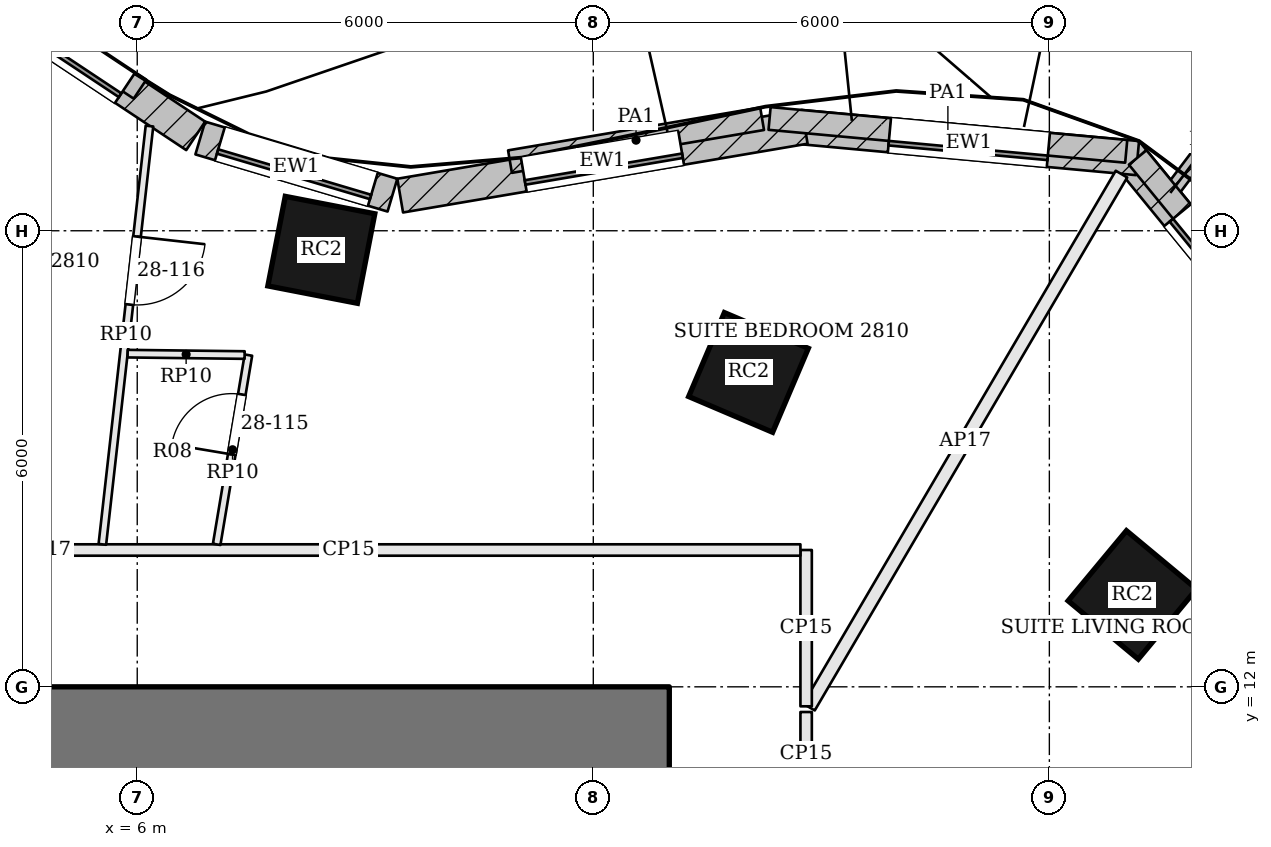
"""IFC4 building model, lengths in metres.
Left out: names, types, materials, properties, quantities, classifications, styles, units other than length and angle.
Written with IfcOpenShell. Run it as: python <this file> out.ifc"""

import sys

from ifc_helpers import new_model, si_unit, direction, frame, frame_2d, origin, origin_2d, place, context, subcontext, project, spatial, rectangle, extrude, element, fill, save


model = new_model("IFC4")
c1 = context("Model", 3, precision=1e-05, world=origin(), true_north=direction((0.0, 1.0)))
c2 = subcontext(c1, "Body", "Model", "MODEL_VIEW")
j1 = project(units=[si_unit("LENGTHUNIT", "METRE"), si_unit("PLANEANGLEUNIT", "RADIAN")], contexts=[c1])
p1 = place(None, origin())
s1 = spatial("IfcSite", under=j1, at=p1, CompositionType="ELEMENT")
p2 = place(p1, origin())
s2 = spatial("IfcBuilding", under=s1, at=p2, CompositionType="ELEMENT")
p3 = place(p2, frame((0.0, 0.0, 117.6)))
s3 = spatial("IfcBuildingStorey", under=s2, at=p3, CompositionType="ELEMENT", Elevation=117.6)
p4 = place(p3, frame((-13.0, 11.45, 0.0), z_axis=(0.0, 0.0, 1.0), x_axis=(1.0, 0.0, 0.0)))
e1 = element("IfcWall", 1, at=p4, inside=s3, PredefinedType="SHEAR", context=c2, shape_type="SweptSolid", body=[
    extrude(rectangle(XDim=26.0, YDim=1.1, at=frame_2d((13.0, 0.0))), origin(), (0.0, 0.0, 1.0), 3.6),
])
p5 = place(p4, frame((8.825, 0.0, 0.0)))
e2 = element("IfcOpeningElement", 2, at=p5, cuts=e1, PredefinedType="OPENING", context=c2, shape_type="SweptSolid", body=[
    extrude(rectangle(XDim=1.0, YDim=2.1, at=frame_2d((0.5, 1.05))), frame((0.0, 0.56, 0.0), z_axis=(0.0, -1.0, 0.0), x_axis=(1.0, 0.0, 0.0)), (0.0, 0.0, 1.0), 1.12),
])
p6 = place(p4, frame((11.275, 0.0, 0.0)))
e3 = element("IfcOpeningElement", 3, at=p6, cuts=e1, PredefinedType="OPENING", context=c2, shape_type="SweptSolid", body=[
    extrude(rectangle(XDim=1.0, YDim=2.1, at=frame_2d((0.5, 1.05))), frame((0.0, 0.56, 0.0), z_axis=(0.0, -1.0, 0.0), x_axis=(1.0, 0.0, 0.0)), (0.0, 0.0, 1.0), 1.12),
])
p7 = place(p4, frame((14.125, 0.0, 0.0)))
e4 = element("IfcOpeningElement", 4, at=p7, cuts=e1, PredefinedType="OPENING", context=c2, shape_type="SweptSolid", body=[
    extrude(rectangle(XDim=1.0, YDim=2.1, at=frame_2d((0.5, 1.05))), frame((0.0, 0.56, 0.0), z_axis=(0.0, -1.0, 0.0), x_axis=(1.0, 0.0, 0.0)), (0.0, 0.0, 1.0), 1.12),
])
p8 = place(p4, frame((16.725, 0.0, 0.0)))
e5 = element("IfcOpeningElement", 5, at=p8, cuts=e1, PredefinedType="OPENING", context=c2, shape_type="SweptSolid", body=[
    extrude(rectangle(XDim=0.7, YDim=2.1, at=frame_2d((0.35, 1.05))), frame((0.0, 0.56, 0.0), z_axis=(0.0, -1.0, 0.0), x_axis=(1.0, 0.0, 0.0)), (0.0, 0.0, 1.0), 1.12),
])
for number, where, z_axis, x_axis in (
    (6, (19.092, 13.209, 0.0), (0.0, 0.0, 1.0), (-0.769, 0.639, 0.0)),
    (7, (14.042, 16.136, 0.0), (0.0, 0.0, 1.0), (-0.92, 0.392, 0.0)),
    (8, (8.422, 17.749, 0.0), (0.0, 0.0, 1.0), (-0.982, 0.191, 0.0)),
):
    element("IfcColumn", number, at=place(p3, frame(where, z_axis=z_axis, x_axis=x_axis)), inside=s3, PredefinedType="COLUMN", context=c2, shape_type="SweptSolid", body=[
        extrude(rectangle(XDim=1.2, YDim=1.2, at=origin_2d()), origin(), (0.0, 0.0, 1.0), 2.8),
    ])
p9 = place(p3, frame((21.696, 15.748, 0.0), z_axis=(0.0, 0.0, 1.0), x_axis=(-0.632968710519, 0.774177377288, 0.0)))
e9 = element("IfcWall", 9, at=p9, inside=s3, PredefinedType="SOLIDWALL", context=c2, shape_type="SweptSolid", body=[
    extrude(rectangle(XDim=4.25, YDim=0.45, at=frame_2d((2.125, 0.0))), origin(), (0.0, 0.0, 1.0), 3.3),
])
p10 = place(p9, frame((1.075, 0.0, 0.9)))
e10 = element("IfcOpeningElement", 10, at=p10, cuts=e9, PredefinedType="OPENING", context=c2, shape_type="SweptSolid", body=[
    extrude(rectangle(XDim=2.1, YDim=1.8, at=frame_2d((1.05, 0.9))), frame((0.0, 0.235, 0.0), z_axis=(0.0, -1.0, 0.0), x_axis=(1.0, 0.0, 0.0)), (0.0, 0.0, 1.0), 0.47),
])
p11 = place(p3, frame((19.159, 18.956, 0.0), z_axis=(0.0, 0.0, 1.0), x_axis=(-0.995777399421, 0.091800712424, 0.0)))
e11 = element("IfcWall", 11, at=p11, inside=s3, PredefinedType="SOLIDWALL", context=c2, shape_type="SweptSolid", body=[
    extrude(rectangle(XDim=4.455, YDim=0.45, at=frame_2d((2.227, 0.0))), origin(), (0.0, 0.0, 1.0), 3.3),
])
p12 = place(p11, frame((1.177, 0.0, 0.9)))
e12 = element("IfcOpeningElement", 12, at=p12, cuts=e11, PredefinedType="OPENING", context=c2, shape_type="SweptSolid", body=[
    extrude(rectangle(XDim=2.1, YDim=1.8, at=frame_2d((1.05, 0.9))), frame((0.0, 0.235, 0.0), z_axis=(0.0, -1.0, 0.0), x_axis=(1.0, 0.0, 0.0)), (0.0, 0.0, 1.0), 0.47),
])
p13 = place(p3, frame((14.782, 19.367, 0.0), z_axis=(0.0, 0.0, 1.0), x_axis=(-0.98585584667, -0.167595493934, 0.0)))
e13 = element("IfcWall", 13, at=p13, inside=s3, PredefinedType="SOLIDWALL", context=c2, shape_type="SweptSolid", body=[
    extrude(rectangle(XDim=5.399, YDim=0.45, at=frame_2d((2.699, 0.0))), origin(), (0.0, 0.0, 1.0), 3.3),
])
p14 = place(p13, frame((1.649, 0.0, 0.9)))
e14 = element("IfcOpeningElement", 14, at=p14, cuts=e13, PredefinedType="OPENING", context=c2, shape_type="SweptSolid", body=[
    extrude(rectangle(XDim=2.1, YDim=1.8, at=frame_2d((1.05, 0.9))), frame((0.0, 0.235, 0.0), z_axis=(0.0, -1.0, 0.0), x_axis=(1.0, 0.0, 0.0)), (0.0, 0.0, 1.0), 0.47),
])
p15 = place(p3, frame((9.357, 18.469, 0.0), z_axis=(0.0, 0.0, 1.0), x_axis=(-0.958524054629, 0.285011643091, 0.0)))
e15 = element("IfcWall", 15, at=p15, inside=s3, PredefinedType="SOLIDWALL", context=c2, shape_type="SweptSolid", body=[
    extrude(rectangle(XDim=2.637, YDim=0.45, at=frame_2d((1.319, 0.0))), origin(), (0.0, 0.0, 1.0), 3.3),
])
p16 = place(p15, frame((0.269, 0.0, 0.9)))
e16 = element("IfcOpeningElement", 16, at=p16, cuts=e15, PredefinedType="OPENING", context=c2, shape_type="SweptSolid", body=[
    extrude(rectangle(XDim=2.1, YDim=1.8, at=frame_2d((1.05, 0.9))), frame((0.0, 0.235, 0.0), z_axis=(0.0, -1.0, 0.0), x_axis=(1.0, 0.0, 0.0)), (0.0, 0.0, 1.0), 0.47),
])
p17 = place(p3, frame((6.769, 19.248, 0.0), z_axis=(0.0, 0.0, 1.0), x_axis=(-0.832973379274, 0.553313066375, 0.0)))
e17 = element("IfcWall", 17, at=p17, inside=s3, PredefinedType="SOLIDWALL", context=c2, shape_type="SweptSolid", body=[
    extrude(rectangle(XDim=4.348, YDim=0.45, at=frame_2d((2.174, 0.0))), origin(), (0.0, 0.0, 1.0), 3.3),
])
p18 = place(p17, frame((1.124, 0.0, 0.9)))
e18 = element("IfcOpeningElement", 18, at=p18, cuts=e17, PredefinedType="OPENING", context=c2, shape_type="SweptSolid", body=[
    extrude(rectangle(XDim=2.1, YDim=1.8, at=frame_2d((1.05, 0.9))), frame((0.0, 0.235, 0.0), z_axis=(0.0, -1.0, 0.0), x_axis=(1.0, 0.0, 0.0)), (0.0, 0.0, 1.0), 0.47),
])
p19 = place(p3, frame((19.591, 18.498, 0.0), z_axis=(0.0, 0.0, 1.0), x_axis=(0.603387525063, 0.797448114048, 0.0)))
e19 = element("IfcWall", 19, at=p19, inside=s3, PredefinedType="SOLIDWALL", context=c2, shape_type="SweptSolid", body=[
    extrude(rectangle(XDim=1.75, YDim=0.2, at=frame_2d((0.875, 0.0))), origin(), (0.0, 0.0, 1.0), 3.3),
])
p20 = place(p3, frame((21.691, 15.872, 3.6), z_axis=(0.0, 0.0, 1.0), x_axis=(-0.632984818356, 0.774164207214, 0.0)))
e20 = element("IfcWall", 20, at=p20, inside=s3, PredefinedType="PARAPET", context=c2, shape_type="SweptSolid", body=[
    extrude(rectangle(XDim=3.995, YDim=0.3, at=frame_2d((1.997, 0.0))), origin(), (0.0, 0.0, 1.0), 1.1),
])
p21 = place(p3, frame((19.011, 19.045, 3.6), z_axis=(0.0, 0.0, 1.0), x_axis=(-0.995781185236, 0.091759637809, 0.0)))
e21 = element("IfcWall", 21, at=p21, inside=s3, PredefinedType="PARAPET", context=c2, shape_type="SweptSolid", body=[
    extrude(rectangle(XDim=4.712, YDim=0.3, at=frame_2d((2.356, 0.0))), origin(), (0.0, 0.0, 1.0), 1.1),
])
p22 = place(p3, frame((14.221, 19.473, 3.6), z_axis=(0.0, 0.0, 1.0), x_axis=(-0.985863279186, -0.167551767381, 0.0)))
e22 = element("IfcWall", 22, at=p22, inside=s3, PredefinedType="PARAPET", context=c2, shape_type="SweptSolid", body=[
    extrude(rectangle(XDim=3.365, YDim=0.3, at=frame_2d((1.682, 0.0))), origin(), (0.0, 0.0, 1.0), 1.1),
])
p23 = place(p3, frame((6.037, 19.863, 3.6), z_axis=(0.0, 0.0, 1.0), x_axis=(-0.832989992548, 0.553288055459, 0.0)))
e23 = element("IfcWall", 23, at=p23, inside=s3, PredefinedType="PARAPET", context=c2, shape_type="SweptSolid", body=[
    extrude(rectangle(XDim=3.154, YDim=0.3, at=frame_2d((1.577, 0.0))), origin(), (0.0, 0.0, 1.0), 1.1),
])
p24 = place(p3, frame((14.8, 10.572, 0.0), z_axis=(0.0, 0.0, 1.0), x_axis=(0.0, 1.0, 0.0)))
e24 = element("IfcWall", 24, at=p24, inside=s3, PredefinedType="PARTITIONING", context=c2, shape_type="SweptSolid", body=[
    extrude(rectangle(XDim=1.097, YDim=0.15, at=frame_2d((0.548, 0.0))), origin(), (0.0, 0.0, 1.0), 2.684),
])
p25 = place(p3, frame((18.949, 18.745, 0.0), z_axis=(0.0, 0.0, 1.0), x_axis=(-0.505754187447, -0.862677634972, 0.0)))
e25 = element("IfcWall", 25, at=p25, inside=s3, PredefinedType="PARTITIONING", context=c2, shape_type="SweptSolid", body=[
    extrude(rectangle(XDim=8.128, YDim=0.175, at=frame_2d((4.064, 0.0))), origin(), (0.0, 0.0, 1.0), 2.684),
])
p26 = place(p3, frame((14.8, 11.744, 0.0), z_axis=(0.0, 0.0, 1.0), x_axis=(0.0, 1.0, 0.0)))
e26 = element("IfcWall", 26, at=p26, inside=s3, PredefinedType="PARTITIONING", context=c2, shape_type="SweptSolid", body=[
    extrude(rectangle(XDim=2.056, YDim=0.15, at=frame_2d((1.028, 0.0))), origin(), (0.0, 0.0, 1.0), 2.684),
])
p27 = place(p3, frame((14.725, 13.8, 0.0), z_axis=(0.0, 0.0, 1.0), x_axis=(-1.0, 0.0, 0.0)))
e27 = element("IfcWall", 27, at=p27, inside=s3, PredefinedType="PARTITIONING", context=c2, shape_type="SweptSolid", body=[
    extrude(rectangle(XDim=11.889, YDim=0.15, at=frame_2d((5.945, 0.0))), origin(), (0.0, 0.0, 1.0), 2.684),
])
p28 = place(p27, frame((10.041, 0.0, 0.0)))
e28 = element("IfcOpeningElement", 28, at=p28, cuts=e27, PredefinedType="OPENING", context=c2, shape_type="SweptSolid", body=[
    extrude(rectangle(XDim=1.0, YDim=2.1, at=frame_2d((0.5, 1.05))), frame((0.0, 0.085, 0.0), z_axis=(0.0, -1.0, 0.0), x_axis=(1.0, 0.0, 0.0)), (0.0, 0.0, 1.0), 0.17),
])
p29 = place(p3, frame((22.414, 11.576, 0.0), z_axis=(0.0, 0.0, 1.0), x_axis=(-0.77113161257, -0.636675769992, 0.0)))
e29 = element("IfcWall", 29, at=p29, inside=s3, PredefinedType="PARTITIONING", context=c2, shape_type="SweptSolid", body=[
    extrude(rectangle(XDim=5.89, YDim=0.1, at=frame_2d((2.945, 0.0))), origin(), (0.0, 0.0, 1.0), 2.684),
])
p30 = place(p29, frame((1.815, 0.0, 0.0)))
e30 = element("IfcOpeningElement", 30, at=p30, cuts=e29, PredefinedType="OPENING", context=c2, shape_type="SweptSolid", body=[
    extrude(rectangle(XDim=0.9, YDim=2.4, at=frame_2d((0.45, 1.2))), frame((0.0, 0.06, 0.0), z_axis=(0.0, -1.0, 0.0), x_axis=(1.0, 0.0, 0.0)), (0.0, 0.0, 1.0), 0.12),
])
p31 = place(p3, frame((6.161, 19.377, 0.0), z_axis=(0.0, 0.0, 1.0), x_axis=(-0.11193626313, -0.993715388326, 0.0)))
e31 = element("IfcWall", 31, at=p31, inside=s3, PredefinedType="PARTITIONING", context=c2, shape_type="SweptSolid", body=[
    extrude(rectangle(XDim=5.538, YDim=0.1, at=frame_2d((2.769, 0.0))), origin(), (0.0, 0.0, 1.0), 2.684),
])
p32 = place(p31, frame((1.463, 0.0, 0.0)))
e32 = element("IfcOpeningElement", 32, at=p32, cuts=e31, PredefinedType="OPENING", context=c2, shape_type="SweptSolid", body=[
    extrude(rectangle(XDim=0.9, YDim=2.4, at=frame_2d((0.45, 1.2))), frame((0.0, 0.06, 0.0), z_axis=(0.0, -1.0, 0.0), x_axis=(1.0, 0.0, 0.0)), (0.0, 0.0, 1.0), 0.12),
])
p33 = place(p3, frame((7.045, 13.874, 0.0), z_axis=(0.0, 0.0, 1.0), x_axis=(0.165339678844, 0.986236680823, 0.0)))
e33 = element("IfcWall", 33, at=p33, inside=s3, PredefinedType="PARTITIONING", context=c2, shape_type="SweptSolid", body=[
    extrude(rectangle(XDim=2.525, YDim=0.1, at=frame_2d((1.262, 0.0))), origin(), (0.0, 0.0, 1.0), 2.684),
])
p34 = place(p33, frame((1.2, 0.0, 0.0)))
e34 = element("IfcOpeningElement", 34, at=p34, cuts=e33, PredefinedType="OPENING", context=c2, shape_type="SweptSolid", body=[
    extrude(rectangle(XDim=0.8, YDim=2.1, at=frame_2d((0.4, 1.05))), frame((0.0, 0.06, 0.0), z_axis=(0.0, -1.0, 0.0), x_axis=(1.0, 0.0, 0.0)), (0.0, 0.0, 1.0), 0.12),
])
p35 = place(p3, frame((7.413, 16.365, 0.0), z_axis=(0.0, 0.0, 1.0), x_axis=(-0.999929213278, 0.011898253371, 0.0)))
e35 = element("IfcWall", 35, at=p35, inside=s3, PredefinedType="PARTITIONING", context=c2, shape_type="SweptSolid", body=[
    extrude(rectangle(XDim=1.539, YDim=0.1, at=frame_2d((0.77, 0.0))), origin(), (0.0, 0.0, 1.0), 2.684),
])
p36 = place(p10, origin())
e36 = element("IfcWindow", 36, at=p36, inside=s3, PartitioningType="SINGLE_PANEL", PredefinedType="WINDOW", context=c2, shape_type="SweptSolid", body=[
    extrude(rectangle(XDim=2.1, YDim=1.8, at=frame_2d((1.05, 0.9))), frame((0.0, 0.135, 0.0), z_axis=(0.0, -1.0, 0.0), x_axis=(1.0, 0.0, 0.0)), (0.0, 0.0, 1.0), 0.06),
])
fill(e10, e36)
p37 = place(p12, origin())
e37 = element("IfcWindow", 37, at=p37, inside=s3, PartitioningType="SINGLE_PANEL", PredefinedType="WINDOW", context=c2, shape_type="SweptSolid", body=[
    extrude(rectangle(XDim=2.1, YDim=1.8, at=frame_2d((1.05, 0.9))), frame((0.0, 0.135, 0.0), z_axis=(0.0, -1.0, 0.0), x_axis=(1.0, 0.0, 0.0)), (0.0, 0.0, 1.0), 0.06),
])
fill(e12, e37)
p38 = place(p14, origin())
e38 = element("IfcWindow", 38, at=p38, inside=s3, PartitioningType="SINGLE_PANEL", PredefinedType="WINDOW", context=c2, shape_type="SweptSolid", body=[
    extrude(rectangle(XDim=2.1, YDim=1.8, at=frame_2d((1.05, 0.9))), frame((0.0, 0.135, 0.0), z_axis=(0.0, -1.0, 0.0), x_axis=(1.0, 0.0, 0.0)), (0.0, 0.0, 1.0), 0.06),
])
fill(e14, e38)
p39 = place(p16, origin())
e39 = element("IfcWindow", 39, at=p39, inside=s3, PartitioningType="SINGLE_PANEL", PredefinedType="WINDOW", context=c2, shape_type="SweptSolid", body=[
    extrude(rectangle(XDim=2.1, YDim=1.8, at=frame_2d((1.05, 0.9))), frame((0.0, 0.135, 0.0), z_axis=(0.0, -1.0, 0.0), x_axis=(1.0, 0.0, 0.0)), (0.0, 0.0, 1.0), 0.06),
])
fill(e16, e39)
p40 = place(p18, origin())
e40 = element("IfcWindow", 40, at=p40, inside=s3, PartitioningType="SINGLE_PANEL", PredefinedType="WINDOW", context=c2, shape_type="SweptSolid", body=[
    extrude(rectangle(XDim=2.1, YDim=1.8, at=frame_2d((1.05, 0.9))), frame((0.0, 0.135, 0.0), z_axis=(0.0, -1.0, 0.0), x_axis=(1.0, 0.0, 0.0)), (0.0, 0.0, 1.0), 0.06),
])
fill(e18, e40)
p41 = place(p34, origin())
e41 = element("IfcDoor", 41, at=p41, inside=s3, OperationType="SINGLE_SWING_LEFT", PredefinedType="DOOR", context=c2, shape_type="SweptSolid", body=[
    extrude(rectangle(XDim=0.8, YDim=2.1, at=frame_2d((0.4, 1.05))), frame((0.0, 0.025, 0.0), z_axis=(0.0, -1.0, 0.0), x_axis=(1.0, 0.0, 0.0)), (0.0, 0.0, 1.0), 0.05),
])
fill(e34, e41)
p42 = place(p32, origin())
e42 = element("IfcDoor", 42, at=p42, inside=s3, OperationType="SINGLE_SWING_LEFT", PredefinedType="DOOR", context=c2, shape_type="SweptSolid", body=[
    extrude(rectangle(XDim=0.9, YDim=2.4, at=frame_2d((0.45, 1.2))), frame((0.0, 0.025, 0.0), z_axis=(0.0, -1.0, 0.0), x_axis=(1.0, 0.0, 0.0)), (0.0, 0.0, 1.0), 0.05),
])
fill(e32, e42)
save(model, sys.argv[1])
